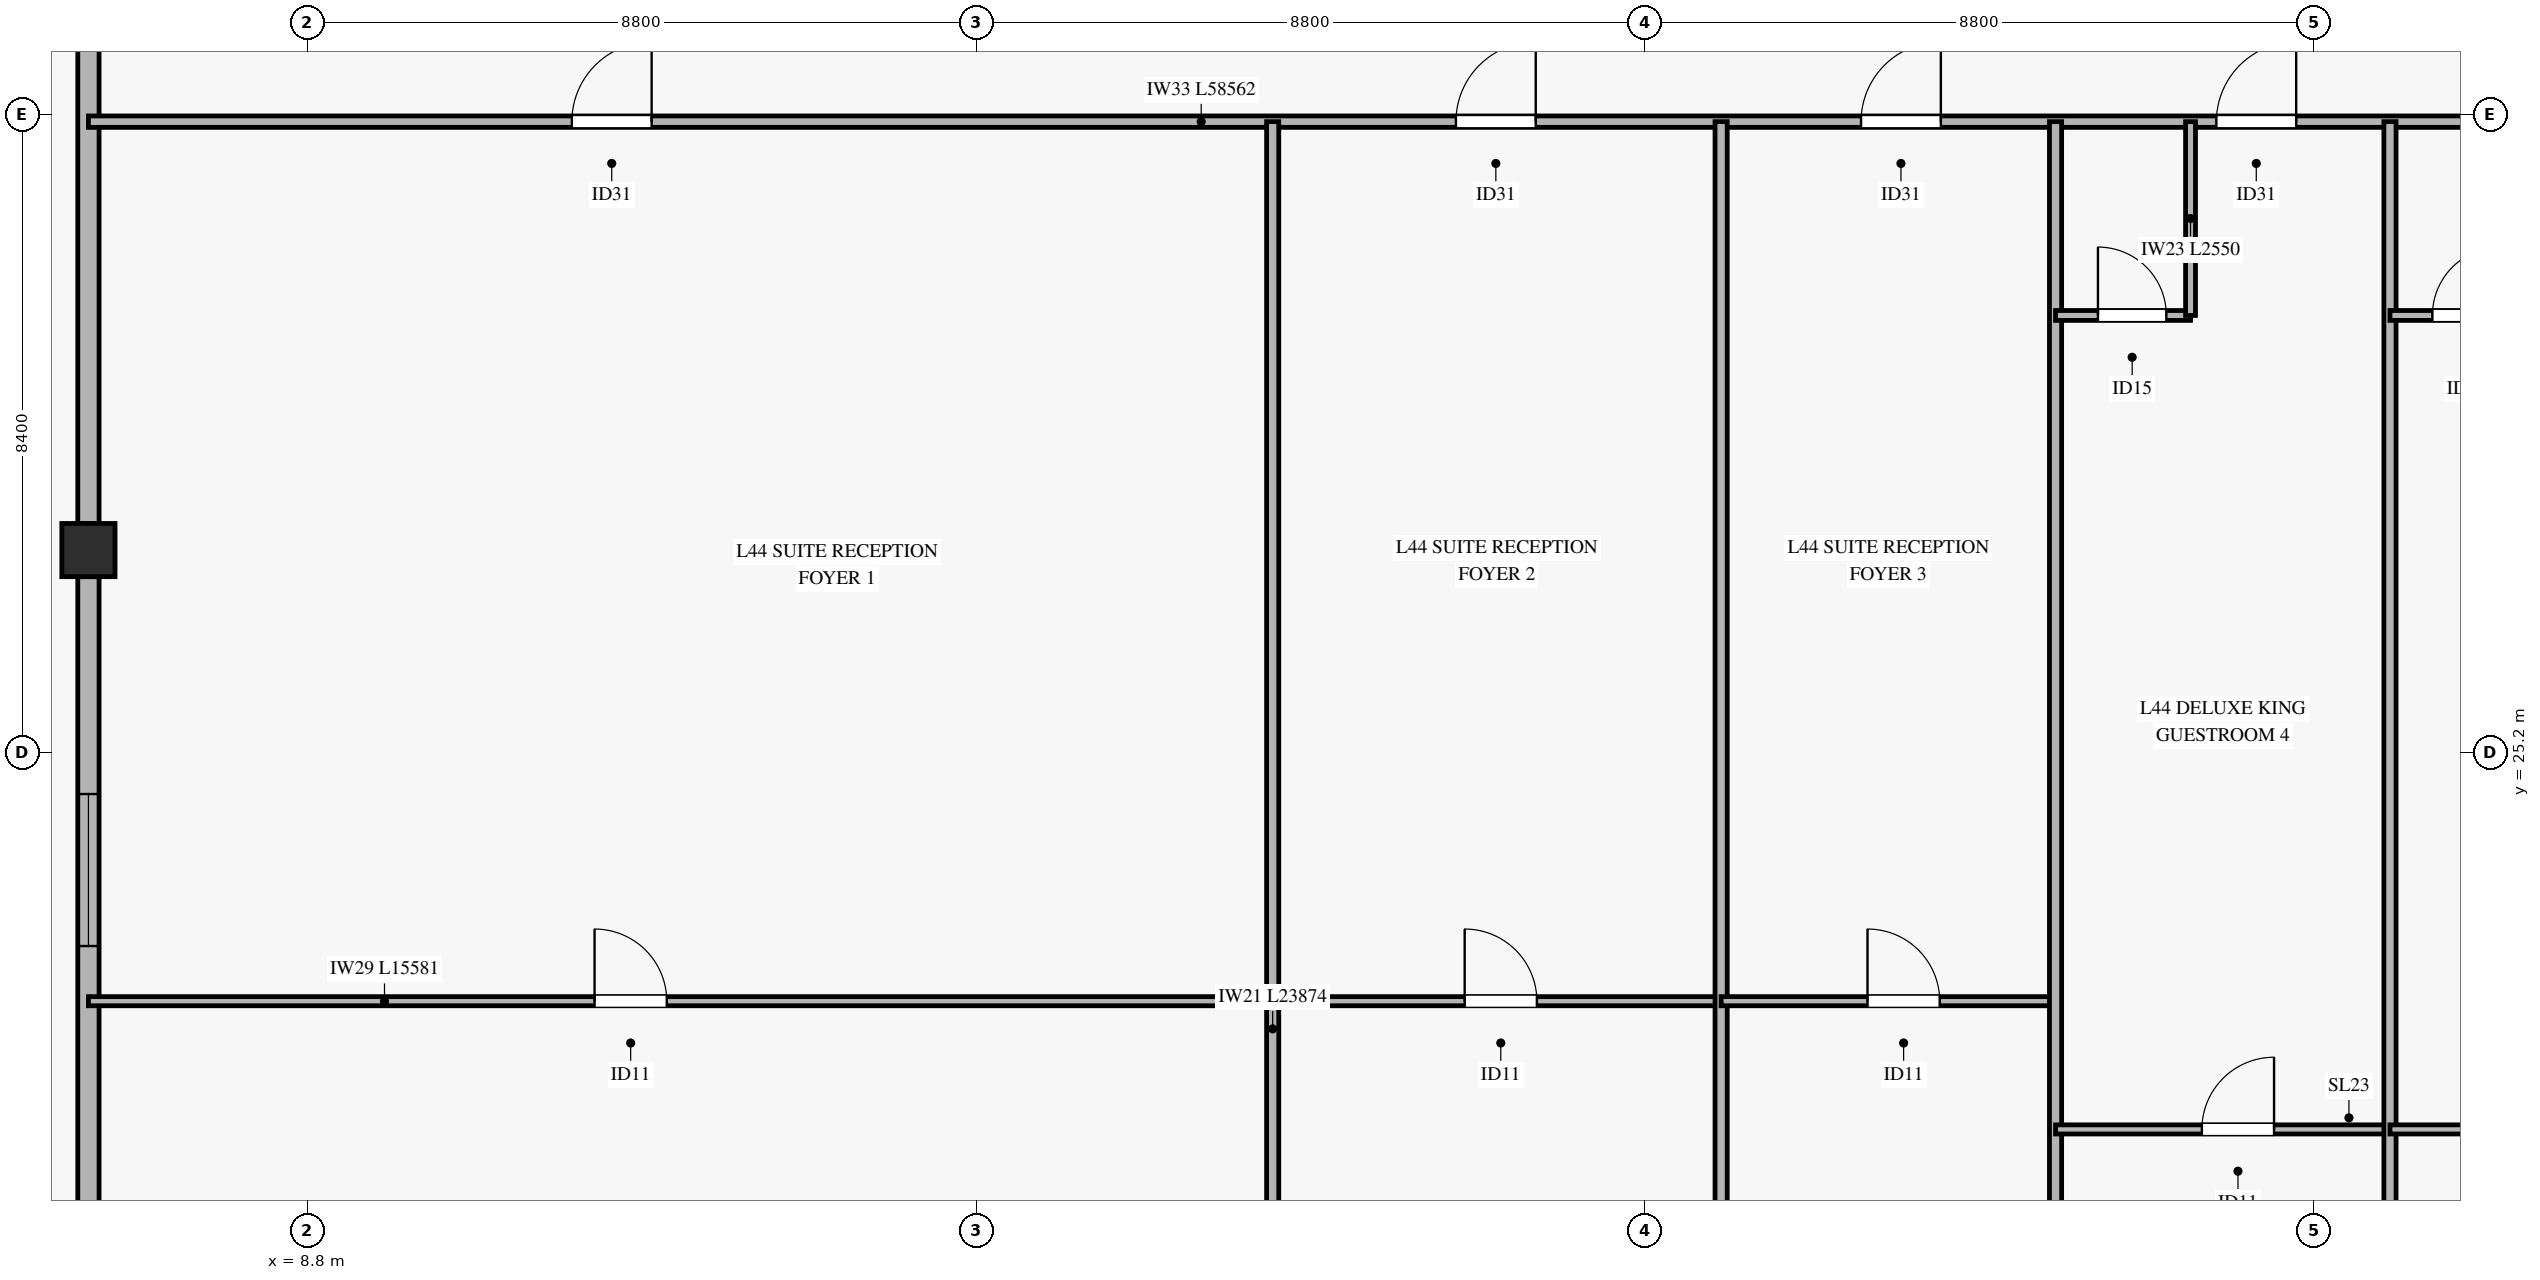
"""IFC4 building model, lengths in metres.
Left out: names, types, materials, properties, quantities, classifications, styles, units other than length and angle.
Written with IfcOpenShell. Run it as: python <this file> out.ifc"""

import sys

from ifc_helpers import new_model, si_unit, direction, frame, frame_2d, origin, origin_2d, place, context, subcontext, project, spatial, rectangle, hollow_rectangle, extrude, source, transform, mapped, element, fill, save


model = new_model("IFC4")
c1 = context("Model", 3, precision=1e-05, world=origin(), true_north=direction((0.0, 1.0)))
c2 = subcontext(c1, "Body", "Model", "MODEL_VIEW")
j1 = project(units=[si_unit("LENGTHUNIT", "METRE"), si_unit("PLANEANGLEUNIT", "RADIAN")], contexts=[c1])
p1 = place(None, origin())
s1 = spatial("IfcSite", under=j1, at=p1, CompositionType="ELEMENT")
p2 = place(p1, origin())
s2 = spatial("IfcBuilding", under=s1, at=p2, CompositionType="ELEMENT")
p3 = place(p2, frame((0.0, 0.0, 177.2)))
s3 = spatial("IfcBuildingStorey", under=s2, at=p3, CompositionType="ELEMENT", Elevation=177.2)
m1 = source(origin(), c2, "Body", "SweptSolid", [
    extrude(hollow_rectangle(XDim=0.7, YDim=0.7, WallThickness=0.032, at=origin_2d()), origin(), (0.0, 0.0, 1.0), 3.289),
])
p4 = place(p3, frame((5.919, 27.863, 0.0), z_axis=(0.071481516224, 0.08024041437, 0.9942091675), x_axis=(-0.746684793699, 0.66517803546, 0.0)))
e1 = element("IfcColumn", 1, at=p4, inside=s3, PredefinedType="COLUMN", context=c2, shape_type="MappedRepresentation", body=[
    mapped(m1, transform((0.0, 0.0, 0.0), x_axis=(1.0, 0.0, 0.0), y_axis=(0.0, 1.0, 0.0), z_axis=(0.0, 0.0, 1.0), scale=1.0)),
])
p5 = place(p3, frame((5.919, 12.513, 0.0), z_axis=(0.0, 0.0, 1.0), x_axis=(0.0, 1.0, 0.0)))
e2 = element("IfcWall", 2, at=p5, inside=s3, PredefinedType="SOLIDWALL", context=c2, shape_type="SweptSolid", body=[
    extrude(rectangle(XDim=15.0, YDim=0.28, at=frame_2d((7.5, 0.0))), origin(), (0.0, 0.0, 1.0), 2.75),
])
p6 = place(p5, frame((3.14, 0.0, 0.45)))
e3 = element("IfcOpeningElement", 3, at=p6, cuts=e2, PredefinedType="OPENING", context=c2, shape_type="SweptSolid", body=[
    extrude(rectangle(XDim=2.0, YDim=2.0, at=frame_2d((1.0, 1.0))), frame((0.0, 0.15, 0.0), z_axis=(0.0, -1.0, 0.0), x_axis=(1.0, 0.0, 0.0)), (0.0, 0.0, 1.0), 0.3),
])
p7 = place(p5, frame((10.14, 0.0, 0.45)))
e4 = element("IfcOpeningElement", 4, at=p7, cuts=e2, PredefinedType="OPENING", context=c2, shape_type="SweptSolid", body=[
    extrude(rectangle(XDim=2.0, YDim=2.0, at=frame_2d((1.0, 1.0))), frame((0.0, 0.15, 0.0), z_axis=(0.0, -1.0, 0.0), x_axis=(1.0, 0.0, 0.0)), (0.0, 0.0, 1.0), 0.3),
])
p8 = place(p3, frame((5.919, 28.213, 0.0), z_axis=(0.0, 0.0, 1.0), x_axis=(0.0, 1.0, 0.0)))
e5 = element("IfcWall", 5, at=p8, inside=s3, PredefinedType="SOLIDWALL", context=c2, shape_type="SweptSolid", body=[
    extrude(rectangle(XDim=15.0, YDim=0.28, at=frame_2d((7.5, 0.0))), origin(), (0.0, 0.0, 1.0), 2.75),
])
p9 = place(p8, frame((9.642, 0.0, 0.45)))
e6 = element("IfcOpeningElement", 6, at=p9, cuts=e5, PredefinedType="OPENING", context=c2, shape_type="SweptSolid", body=[
    extrude(rectangle(XDim=2.0, YDim=2.0, at=frame_2d((1.0, 1.0))), frame((0.0, 0.15, 0.0), z_axis=(0.0, -1.0, 0.0), x_axis=(1.0, 0.0, 0.0)), (0.0, 0.0, 1.0), 0.3),
])
p10 = place(p3, frame((5.919, 33.5, 0.0), z_axis=(0.0, 0.0, 1.0), x_axis=(1.0, 0.0, 0.0)))
e7 = element("IfcWall", 7, at=p10, inside=s3, PredefinedType="PARTITIONING", context=c2, shape_type="SweptSolid", body=[
    extrude(rectangle(XDim=58.562, YDim=0.15, at=frame_2d((29.281, 0.0))), origin(), (0.0, 0.0, 1.0), 2.455),
])
p11 = place(p10, frame((6.36, 0.0, 0.0)))
e8 = element("IfcOpeningElement", 8, at=p11, cuts=e7, PredefinedType="OPENING", context=c2, shape_type="SweptSolid", body=[
    extrude(rectangle(XDim=1.05, YDim=2.15, at=frame_2d((0.525, 1.075))), frame((0.0, 0.085, 0.0), z_axis=(0.0, -1.0, 0.0), x_axis=(1.0, 0.0, 0.0)), (0.0, 0.0, 1.0), 0.17),
])
p12 = place(p10, frame((17.992, 0.0, 0.0)))
e9 = element("IfcOpeningElement", 9, at=p12, cuts=e7, PredefinedType="OPENING", context=c2, shape_type="SweptSolid", body=[
    extrude(rectangle(XDim=1.05, YDim=2.15, at=frame_2d((0.525, 1.075))), frame((0.0, 0.085, 0.0), z_axis=(0.0, -1.0, 0.0), x_axis=(1.0, 0.0, 0.0)), (0.0, 0.0, 1.0), 0.17),
])
p13 = place(p10, frame((23.322, 0.0, 0.0)))
e10 = element("IfcOpeningElement", 10, at=p13, cuts=e7, PredefinedType="OPENING", context=c2, shape_type="SweptSolid", body=[
    extrude(rectangle(XDim=1.05, YDim=2.15, at=frame_2d((0.525, 1.075))), frame((0.0, 0.085, 0.0), z_axis=(0.0, -1.0, 0.0), x_axis=(1.0, 0.0, 0.0)), (0.0, 0.0, 1.0), 0.17),
])
p14 = place(p10, frame((27.997, 0.0, 0.0)))
e11 = element("IfcOpeningElement", 11, at=p14, cuts=e7, PredefinedType="OPENING", context=c2, shape_type="SweptSolid", body=[
    extrude(rectangle(XDim=1.05, YDim=2.15, at=frame_2d((0.525, 1.075))), frame((0.0, 0.085, 0.0), z_axis=(0.0, -1.0, 0.0), x_axis=(1.0, 0.0, 0.0)), (0.0, 0.0, 1.0), 0.17),
])
p15 = place(p10, frame((32.397, 0.0, 0.0)))
e12 = element("IfcOpeningElement", 12, at=p15, cuts=e7, PredefinedType="OPENING", context=c2, shape_type="SweptSolid", body=[
    extrude(rectangle(XDim=1.05, YDim=2.15, at=frame_2d((0.525, 1.075))), frame((0.0, 0.085, 0.0), z_axis=(0.0, -1.0, 0.0), x_axis=(1.0, 0.0, 0.0)), (0.0, 0.0, 1.0), 0.17),
])
p16 = place(p10, frame((36.877, 0.0, 0.0)))
e13 = element("IfcOpeningElement", 13, at=p16, cuts=e7, PredefinedType="OPENING", context=c2, shape_type="SweptSolid", body=[
    extrude(rectangle(XDim=1.05, YDim=2.15, at=frame_2d((0.525, 1.075))), frame((0.0, 0.085, 0.0), z_axis=(0.0, -1.0, 0.0), x_axis=(1.0, 0.0, 0.0)), (0.0, 0.0, 1.0), 0.17),
])
p17 = place(p10, frame((46.612, 0.0, 0.0)))
e14 = element("IfcOpeningElement", 14, at=p17, cuts=e7, PredefinedType="OPENING", context=c2, shape_type="SweptSolid", body=[
    extrude(rectangle(XDim=1.05, YDim=2.15, at=frame_2d((0.525, 1.075))), frame((0.0, 0.085, 0.0), z_axis=(0.0, -1.0, 0.0), x_axis=(1.0, 0.0, 0.0)), (0.0, 0.0, 1.0), 0.17),
])
p18 = place(p3, frame((5.919, 21.927, 0.0), z_axis=(0.0, 0.0, 1.0), x_axis=(1.0, 0.0, 0.0)))
e15 = element("IfcWall", 15, at=p18, inside=s3, PredefinedType="PARTITIONING", context=c2, shape_type="SweptSolid", body=[
    extrude(rectangle(XDim=15.581, YDim=0.12, at=frame_2d((7.791, 0.0))), origin(), (0.0, 0.0, 1.0), 2.455),
])
p19 = place(p18, frame((6.659, 0.0, 0.0)))
e16 = element("IfcOpeningElement", 16, at=p19, cuts=e15, PredefinedType="OPENING", context=c2, shape_type="SweptSolid", body=[
    extrude(rectangle(XDim=0.95, YDim=2.1, at=frame_2d((0.475, 1.05))), frame((0.0, 0.07, 0.0), z_axis=(0.0, -1.0, 0.0), x_axis=(1.0, 0.0, 0.0)), (0.0, 0.0, 1.0), 0.14),
])
p20 = place(p3, frame((21.5, 9.626, 0.0), z_axis=(0.0, 0.0, 1.0), x_axis=(0.0, 1.0, 0.0)))
e17 = element("IfcWall", 17, at=p20, inside=s3, PredefinedType="PARTITIONING", context=c2, shape_type="SweptSolid", body=[
    extrude(rectangle(XDim=23.874, YDim=0.16, at=frame_2d((11.937, 0.0))), origin(), (0.0, 0.0, 1.0), 2.755),
])
p21 = place(p3, frame((21.5, 21.927, 0.0), z_axis=(0.0, 0.0, 1.0), x_axis=(1.0, 0.0, 0.0)))
e18 = element("IfcWall", 18, at=p21, inside=s3, PredefinedType="PARTITIONING", context=c2, shape_type="SweptSolid", body=[
    extrude(rectangle(XDim=5.9, YDim=0.12, at=frame_2d((2.95, 0.0))), origin(), (0.0, 0.0, 1.0), 3.27),
])
p22 = place(p21, frame((2.526, 0.0, 0.0)))
e19 = element("IfcOpeningElement", 19, at=p22, cuts=e18, PredefinedType="OPENING", context=c2, shape_type="SweptSolid", body=[
    extrude(rectangle(XDim=0.95, YDim=2.1, at=frame_2d((0.475, 1.05))), frame((0.0, 0.07, 0.0), z_axis=(0.0, -1.0, 0.0), x_axis=(1.0, 0.0, 0.0)), (0.0, 0.0, 1.0), 0.14),
])
p23 = place(p3, frame((27.4, 9.626, 0.0), z_axis=(0.0, 0.0, 1.0), x_axis=(0.0, 1.0, 0.0)))
e20 = element("IfcWall", 20, at=p23, inside=s3, PredefinedType="PARTITIONING", context=c2, shape_type="SweptSolid", body=[
    extrude(rectangle(XDim=23.874, YDim=0.16, at=frame_2d((11.937, 0.0))), origin(), (0.0, 0.0, 1.0), 2.755),
])
p24 = place(p3, frame((27.4, 21.927, 0.0), z_axis=(0.0, 0.0, 1.0), x_axis=(1.0, 0.0, 0.0)))
e21 = element("IfcWall", 21, at=p24, inside=s3, PredefinedType="PARTITIONING", context=c2, shape_type="SweptSolid", body=[
    extrude(rectangle(XDim=4.4, YDim=0.12, at=frame_2d((2.2, 0.0))), origin(), (0.0, 0.0, 1.0), 2.455),
])
p25 = place(p24, frame((1.926, 0.0, 0.0)))
e22 = element("IfcOpeningElement", 22, at=p25, cuts=e21, PredefinedType="OPENING", context=c2, shape_type="SweptSolid", body=[
    extrude(rectangle(XDim=0.95, YDim=2.1, at=frame_2d((0.475, 1.05))), frame((0.0, 0.07, 0.0), z_axis=(0.0, -1.0, 0.0), x_axis=(1.0, 0.0, 0.0)), (0.0, 0.0, 1.0), 0.14),
])
p26 = place(p3, frame((31.8, 9.626, 0.0), z_axis=(0.0, 0.0, 1.0), x_axis=(0.0, 1.0, 0.0)))
e23 = element("IfcWall", 23, at=p26, inside=s3, PredefinedType="PARTITIONING", context=c2, shape_type="SweptSolid", body=[
    extrude(rectangle(XDim=23.874, YDim=0.16, at=frame_2d((11.937, 0.0))), origin(), (0.0, 0.0, 1.0), 2.755),
])
p27 = place(p3, frame((31.8, 30.95, 0.0), z_axis=(0.0, 0.0, 1.0), x_axis=(1.0, 0.0, 0.0)))
e24 = element("IfcWall", 24, at=p27, inside=s3, PredefinedType="PARTITIONING", context=c2, shape_type="SweptSolid", body=[
    extrude(rectangle(XDim=1.776, YDim=0.13, at=frame_2d((0.888, 0.0))), origin(), (0.0, 0.0, 1.0), 3.27),
])
p28 = place(p27, frame((0.558, 0.0, 0.0)))
e25 = element("IfcOpeningElement", 25, at=p28, cuts=e24, PredefinedType="OPENING", context=c2, shape_type="SweptSolid", body=[
    extrude(rectangle(XDim=0.9, YDim=2.1, at=frame_2d((0.45, 1.05))), frame((0.0, 0.075, 0.0), z_axis=(0.0, -1.0, 0.0), x_axis=(1.0, 0.0, 0.0)), (0.0, 0.0, 1.0), 0.15),
])
p29 = place(p3, frame((33.576, 30.95, 0.0), z_axis=(0.0, 0.0, 1.0), x_axis=(0.0, 1.0, 0.0)))
e26 = element("IfcWall", 26, at=p29, inside=s3, PredefinedType="PARTITIONING", context=c2, shape_type="SweptSolid", body=[
    extrude(rectangle(XDim=2.55, YDim=0.13, at=frame_2d((1.275, 0.0))), origin(), (0.0, 0.0, 1.0), 2.805),
])
p30 = place(p3, frame((31.8, 20.24, 0.0), z_axis=(0.0, 0.0, 1.0), x_axis=(1.0, 0.0, 0.0)))
e27 = element("IfcWall", 27, at=p30, inside=s3, PredefinedType="PARTITIONING", context=c2, shape_type="SweptSolid", body=[
    extrude(rectangle(XDim=4.4, YDim=0.12, at=frame_2d((2.2, 0.0))), origin(), (0.0, 0.0, 1.0), 3.27),
])
p31 = place(p30, frame((1.925, 0.0, 0.0)))
e28 = element("IfcOpeningElement", 28, at=p31, cuts=e27, PredefinedType="OPENING", context=c2, shape_type="SweptSolid", body=[
    extrude(rectangle(XDim=0.95, YDim=2.1, at=frame_2d((0.475, 1.05))), frame((0.0, 0.07, 0.0), z_axis=(0.0, -1.0, 0.0), x_axis=(1.0, 0.0, 0.0)), (0.0, 0.0, 1.0), 0.14),
])
p32 = place(p3, frame((36.2, 9.626, 0.0), z_axis=(0.0, 0.0, 1.0), x_axis=(0.0, 1.0, 0.0)))
e29 = element("IfcWall", 29, at=p32, inside=s3, PredefinedType="PARTITIONING", context=c2, shape_type="SweptSolid", body=[
    extrude(rectangle(XDim=23.874, YDim=0.16, at=frame_2d((11.937, 0.0))), origin(), (0.0, 0.0, 1.0), 2.755),
])
p33 = place(p3, frame((36.2, 30.95, 0.0), z_axis=(0.0, 0.0, 1.0), x_axis=(1.0, 0.0, 0.0)))
e30 = element("IfcWall", 30, at=p33, inside=s3, PredefinedType="PARTITIONING", context=c2, shape_type="SweptSolid", body=[
    extrude(rectangle(XDim=1.776, YDim=0.13, at=frame_2d((0.888, 0.0))), origin(), (0.0, 0.0, 1.0), 2.455),
])
p34 = place(p33, frame((0.558, 0.0, 0.0)))
e31 = element("IfcOpeningElement", 31, at=p34, cuts=e30, PredefinedType="OPENING", context=c2, shape_type="SweptSolid", body=[
    extrude(rectangle(XDim=0.9, YDim=2.1, at=frame_2d((0.45, 1.05))), frame((0.0, 0.075, 0.0), z_axis=(0.0, -1.0, 0.0), x_axis=(1.0, 0.0, 0.0)), (0.0, 0.0, 1.0), 0.15),
])
p35 = place(p3, frame((36.2, 20.24, 0.0), z_axis=(0.0, 0.0, 1.0), x_axis=(1.0, 0.0, 0.0)))
e32 = element("IfcWall", 32, at=p35, inside=s3, PredefinedType="PARTITIONING", context=c2, shape_type="SweptSolid", body=[
    extrude(rectangle(XDim=4.4, YDim=0.12, at=frame_2d((2.2, 0.0))), origin(), (0.0, 0.0, 1.0), 2.455),
])
p36 = place(p35, frame((1.925, 0.0, 0.0)))
e33 = element("IfcOpeningElement", 33, at=p36, cuts=e32, PredefinedType="OPENING", context=c2, shape_type="SweptSolid", body=[
    extrude(rectangle(XDim=0.95, YDim=2.1, at=frame_2d((0.475, 1.05))), frame((0.0, 0.07, 0.0), z_axis=(0.0, -1.0, 0.0), x_axis=(1.0, 0.0, 0.0)), (0.0, 0.0, 1.0), 0.14),
])
m2 = source(origin(), c2, "Body", "SweptSolid", [
    extrude(rectangle(XDim=2.0, YDim=2.0, at=frame_2d((1.0, 1.0))), frame((0.0, 0.03, 0.0), z_axis=(0.0, -1.0, 0.0), x_axis=(1.0, 0.0, 0.0)), (0.0, 0.0, 1.0), 0.06),
])
p37 = place(p7, origin())
e34 = element("IfcWindow", 34, at=p37, inside=s3, PartitioningType="SINGLE_PANEL", PredefinedType="WINDOW", context=c2, shape_type="MappedRepresentation", body=[
    mapped(m2, transform((0.0, 0.0, 0.0), x_axis=(1.0, 0.0, 0.0), y_axis=(0.0, 1.0, 0.0), z_axis=(0.0, 0.0, 1.0), scale=1.0)),
])
fill(e4, e34)
m3 = source(origin(), c2, "Body", "SweptSolid", [
    extrude(rectangle(XDim=1.05, YDim=2.15, at=frame_2d((0.525, 1.075))), frame((0.0, 0.025, 0.0), z_axis=(0.0, -1.0, 0.0), x_axis=(1.0, 0.0, 0.0)), (0.0, 0.0, 1.0), 0.05),
])
p38 = place(p11, origin())
e35 = element("IfcDoor", 35, at=p38, inside=s3, OperationType="SINGLE_SWING_RIGHT", PredefinedType="DOOR", context=c2, shape_type="MappedRepresentation", body=[
    mapped(m3, transform((0.0, 0.0, 0.0), x_axis=(1.0, 0.0, 0.0), y_axis=(0.0, 1.0, 0.0), z_axis=(0.0, 0.0, 1.0), scale=1.0)),
])
fill(e8, e35)
m4 = source(origin(), c2, "Body", "SweptSolid", [
    extrude(rectangle(XDim=0.95, YDim=2.1, at=frame_2d((0.475, 1.05))), frame((0.0, 0.025, 0.0), z_axis=(0.0, -1.0, 0.0), x_axis=(1.0, 0.0, 0.0)), (0.0, 0.0, 1.0), 0.05),
])
p39 = place(p19, origin())
e36 = element("IfcDoor", 36, at=p39, inside=s3, OperationType="SINGLE_SWING_LEFT", PredefinedType="DOOR", context=c2, shape_type="MappedRepresentation", body=[
    mapped(m4, transform((0.0, 0.0, 0.0), x_axis=(1.0, 0.0, 0.0), y_axis=(0.0, 1.0, 0.0), z_axis=(0.0, 0.0, 1.0), scale=1.0)),
])
fill(e16, e36)
p40 = place(p12, origin())
e37 = element("IfcDoor", 37, at=p40, inside=s3, OperationType="SINGLE_SWING_RIGHT", PredefinedType="DOOR", context=c2, shape_type="MappedRepresentation", body=[
    mapped(m3, transform((0.0, 0.0, 0.0), x_axis=(1.0, 0.0, 0.0), y_axis=(0.0, 1.0, 0.0), z_axis=(0.0, 0.0, 1.0), scale=1.0)),
])
fill(e9, e37)
p41 = place(p22, origin())
e38 = element("IfcDoor", 38, at=p41, inside=s3, OperationType="SINGLE_SWING_LEFT", PredefinedType="DOOR", context=c2, shape_type="MappedRepresentation", body=[
    mapped(m4, transform((0.0, 0.0, 0.0), x_axis=(1.0, 0.0, 0.0), y_axis=(0.0, 1.0, 0.0), z_axis=(0.0, 0.0, 1.0), scale=1.0)),
])
fill(e19, e38)
p42 = place(p13, origin())
e39 = element("IfcDoor", 39, at=p42, inside=s3, OperationType="SINGLE_SWING_RIGHT", PredefinedType="DOOR", context=c2, shape_type="MappedRepresentation", body=[
    mapped(m3, transform((0.0, 0.0, 0.0), x_axis=(1.0, 0.0, 0.0), y_axis=(0.0, 1.0, 0.0), z_axis=(0.0, 0.0, 1.0), scale=1.0)),
])
fill(e10, e39)
p43 = place(p25, origin())
e40 = element("IfcDoor", 40, at=p43, inside=s3, OperationType="SINGLE_SWING_LEFT", PredefinedType="DOOR", context=c2, shape_type="MappedRepresentation", body=[
    mapped(m4, transform((0.0, 0.0, 0.0), x_axis=(1.0, 0.0, 0.0), y_axis=(0.0, 1.0, 0.0), z_axis=(0.0, 0.0, 1.0), scale=1.0)),
])
fill(e22, e40)
p44 = place(p14, origin())
e41 = element("IfcDoor", 41, at=p44, inside=s3, OperationType="SINGLE_SWING_RIGHT", PredefinedType="DOOR", context=c2, shape_type="MappedRepresentation", body=[
    mapped(m3, transform((0.0, 0.0, 0.0), x_axis=(1.0, 0.0, 0.0), y_axis=(0.0, 1.0, 0.0), z_axis=(0.0, 0.0, 1.0), scale=1.0)),
])
fill(e11, e41)
m5 = source(origin(), c2, "Body", "SweptSolid", [
    extrude(rectangle(XDim=0.9, YDim=2.1, at=frame_2d((0.45, 1.05))), frame((0.0, 0.025, 0.0), z_axis=(0.0, -1.0, 0.0), x_axis=(1.0, 0.0, 0.0)), (0.0, 0.0, 1.0), 0.05),
])
p45 = place(p28, origin())
e42 = element("IfcDoor", 42, at=p45, inside=s3, OperationType="SINGLE_SWING_LEFT", PredefinedType="DOOR", context=c2, shape_type="MappedRepresentation", body=[
    mapped(m5, transform((0.0, 0.0, 0.0), x_axis=(1.0, 0.0, 0.0), y_axis=(0.0, 1.0, 0.0), z_axis=(0.0, 0.0, 1.0), scale=1.0)),
])
fill(e25, e42)
p46 = place(p31, origin())
e43 = element("IfcDoor", 43, at=p46, inside=s3, OperationType="SINGLE_SWING_RIGHT", PredefinedType="DOOR", context=c2, shape_type="MappedRepresentation", body=[
    mapped(m4, transform((0.0, 0.0, 0.0), x_axis=(1.0, 0.0, 0.0), y_axis=(0.0, 1.0, 0.0), z_axis=(0.0, 0.0, 1.0), scale=1.0)),
])
fill(e28, e43)
p47 = place(p34, origin())
e44 = element("IfcDoor", 44, at=p47, inside=s3, OperationType="SINGLE_SWING_RIGHT", PredefinedType="DOOR", context=c2, shape_type="MappedRepresentation", body=[
    mapped(m5, transform((0.0, 0.0, 0.0), x_axis=(1.0, 0.0, 0.0), y_axis=(0.0, 1.0, 0.0), z_axis=(0.0, 0.0, 1.0), scale=1.0)),
])
fill(e31, e44)
save(model, sys.argv[1])
